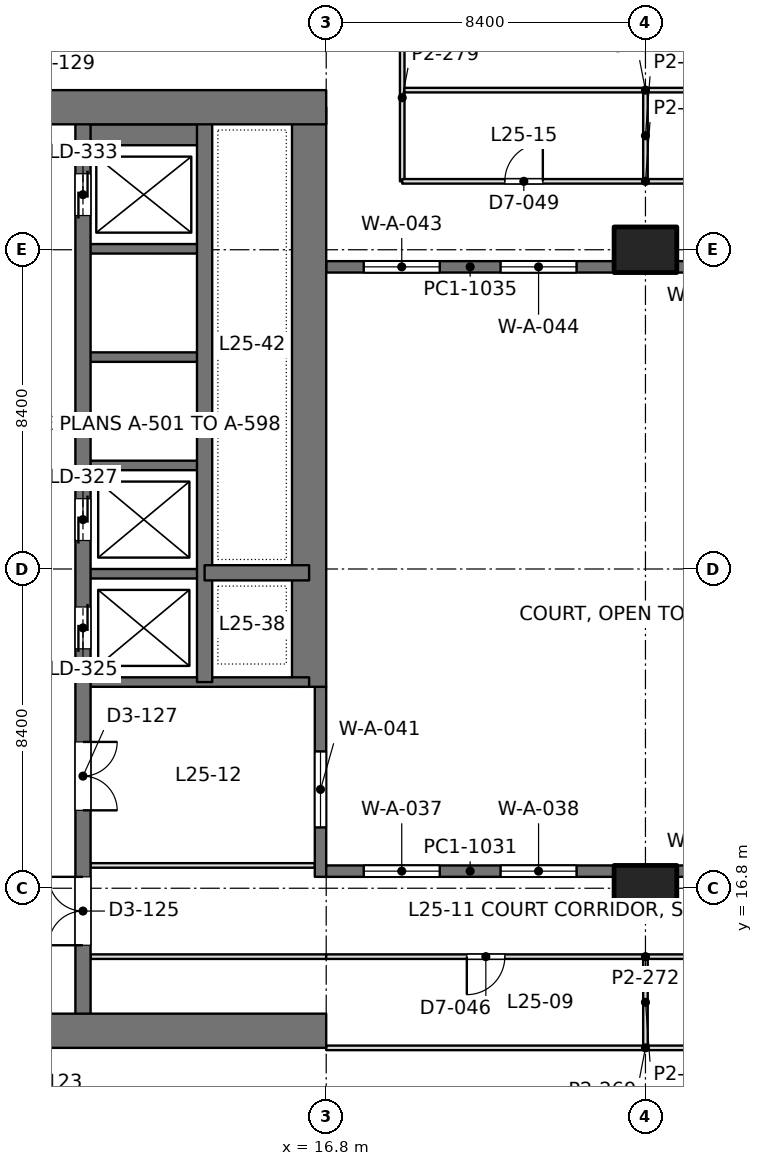
"""IFC4 building model, lengths in metres.
Left out: names, types, materials, properties, quantities, classifications, styles, units other than length and angle.
Written with IfcOpenShell. Run it as: python <this file> out.ifc"""

import sys

from ifc_helpers import new_model, si_unit, direction, frame, frame_2d, origin, origin_2d, place, context, subcontext, project, spatial, rectangle, extrude, element, fill, save


model = new_model("IFC4")
c1 = context("Model", 3, precision=1e-05, world=origin(), true_north=direction((0.0, 1.0)))
c2 = subcontext(c1, "Body", "Model", "MODEL_VIEW")
j1 = project(units=[si_unit("LENGTHUNIT", "METRE"), si_unit("PLANEANGLEUNIT", "RADIAN")], contexts=[c1])
p1 = place(None, origin())
s1 = spatial("IfcSite", under=j1, at=p1, CompositionType="ELEMENT")
p2 = place(p1, origin())
s2 = spatial("IfcBuilding", under=s1, at=p2, CompositionType="ELEMENT")
p3 = place(p2, frame((0.0, 0.0, 113.4)))
s3 = spatial("IfcBuildingStorey", under=s2, at=p3, CompositionType="ELEMENT", Elevation=113.4)
for number, where, z_axis, x_axis in (
    (1, (25.2, 16.8, 0.0), (0.0, 0.0, 1.0), (1.0, 0.0, 0.0)),
    (2, (25.2, 33.6, 0.0), (0.0, 0.0, 1.0), (1.0, 0.0, 0.0)),
):
    element("IfcColumn", number, at=place(p3, frame(where, z_axis=z_axis, x_axis=x_axis)), inside=s3, PredefinedType="COLUMN", context=c2, shape_type="SweptSolid", body=[
        extrude(rectangle(XDim=1.65, YDim=1.2, at=origin_2d()), origin(), (0.0, 0.0, 1.0), 4.2),
    ])
p4 = place(p3, frame((-1.2, 13.05, 0.0), z_axis=(0.0, 0.0, 1.0), x_axis=(1.0, 0.0, 0.0)))
e3 = element("IfcWall", 3, at=p4, inside=s3, PredefinedType="SHEAR", context=c2, shape_type="SweptSolid", body=[
    extrude(rectangle(XDim=18.0, YDim=0.9, at=frame_2d((9.0, 0.0))), origin(), (0.0, 0.0, 1.0), 4.2),
])
p5 = place(p4, frame((8.95, 0.0, 0.0)))
e4 = element("IfcOpeningElement", 4, at=p5, cuts=e3, PredefinedType="OPENING", context=c2, shape_type="SweptSolid", body=[
    extrude(rectangle(XDim=1.8, YDim=2.4, at=frame_2d((0.9, 1.2))), frame((0.0, 0.46, 0.0), z_axis=(0.0, -1.0, 0.0), x_axis=(1.0, 0.0, 0.0)), (0.0, 0.0, 1.0), 0.92),
])
p6 = place(p3, frame((-1.2, 37.35, 0.0), z_axis=(0.0, 0.0, 1.0), x_axis=(1.0, 0.0, 0.0)))
e5 = element("IfcWall", 5, at=p6, inside=s3, PredefinedType="SHEAR", context=c2, shape_type="SweptSolid", body=[
    extrude(rectangle(XDim=18.0, YDim=0.9, at=frame_2d((9.0, 0.0))), origin(), (0.0, 0.0, 1.0), 4.2),
])
p7 = place(p6, frame((8.95, 0.0, 0.0)))
e6 = element("IfcOpeningElement", 6, at=p7, cuts=e5, PredefinedType="OPENING", context=c2, shape_type="SweptSolid", body=[
    extrude(rectangle(XDim=1.8, YDim=2.4, at=frame_2d((0.9, 1.2))), frame((0.0, 0.46, 0.0), z_axis=(0.0, -1.0, 0.0), x_axis=(1.0, 0.0, 0.0)), (0.0, 0.0, 1.0), 0.92),
])
p8 = place(p3, frame((16.35, 22.1, 0.0), z_axis=(0.0, 0.0, 1.0), x_axis=(0.0, 1.0, 0.0)))
e7 = element("IfcWall", 7, at=p8, inside=s3, PredefinedType="SHEAR", context=c2, shape_type="SweptSolid", body=[
    extrude(rectangle(XDim=15.25, YDim=0.9, at=frame_2d((7.625, 0.0))), origin(), (0.0, 0.0, 1.0), 4.2),
])
p9 = place(p3, frame((10.4, 13.05, 0.0), z_axis=(0.0, 0.0, 1.0), x_axis=(0.0, 1.0, 0.0)))
e8 = element("IfcWall", 8, at=p9, inside=s3, PredefinedType="SHEAR", context=c2, shape_type="SweptSolid", body=[
    extrude(rectangle(XDim=24.3, YDim=0.4, at=frame_2d((12.15, 0.0))), origin(), (0.0, 0.0, 1.0), 4.2),
])
p10 = place(p9, frame((10.05, 0.0, 0.0)))
e9 = element("IfcOpeningElement", 9, at=p10, cuts=e8, PredefinedType="OPENING", context=c2, shape_type="SweptSolid", body=[
    extrude(rectangle(XDim=1.1, YDim=2.2, at=frame_2d((0.55, 1.1))), frame((0.0, 0.21, 0.0), z_axis=(0.0, -1.0, 0.0), x_axis=(1.0, 0.0, 0.0)), (0.0, 0.0, 1.0), 0.42),
])
p11 = place(p9, frame((12.9, 0.0, 0.0)))
e10 = element("IfcOpeningElement", 10, at=p11, cuts=e8, PredefinedType="OPENING", context=c2, shape_type="SweptSolid", body=[
    extrude(rectangle(XDim=1.1, YDim=2.2, at=frame_2d((0.55, 1.1))), frame((0.0, 0.21, 0.0), z_axis=(0.0, -1.0, 0.0), x_axis=(1.0, 0.0, 0.0)), (0.0, 0.0, 1.0), 0.42),
])
p12 = place(p9, frame((21.45, 0.0, 0.0)))
e11 = element("IfcOpeningElement", 11, at=p12, cuts=e8, PredefinedType="OPENING", context=c2, shape_type="SweptSolid", body=[
    extrude(rectangle(XDim=1.1, YDim=2.2, at=frame_2d((0.55, 1.1))), frame((0.0, 0.21, 0.0), z_axis=(0.0, -1.0, 0.0), x_axis=(1.0, 0.0, 0.0)), (0.0, 0.0, 1.0), 0.42),
])
p13 = place(p9, frame((2.25, 0.0, 0.0)))
e12 = element("IfcOpeningElement", 12, at=p13, cuts=e8, PredefinedType="OPENING", context=c2, shape_type="SweptSolid", body=[
    extrude(rectangle(XDim=1.8, YDim=2.4, at=frame_2d((0.9, 1.2))), frame((0.0, 0.21, 0.0), z_axis=(0.0, -1.0, 0.0), x_axis=(1.0, 0.0, 0.0)), (0.0, 0.0, 1.0), 0.42),
])
p14 = place(p9, frame((5.8, 0.0, 0.0)))
e13 = element("IfcOpeningElement", 13, at=p14, cuts=e8, PredefinedType="OPENING", context=c2, shape_type="SweptSolid", body=[
    extrude(rectangle(XDim=1.8, YDim=2.4, at=frame_2d((0.9, 1.2))), frame((0.0, 0.21, 0.0), z_axis=(0.0, -1.0, 0.0), x_axis=(1.0, 0.0, 0.0)), (0.0, 0.0, 1.0), 0.42),
])
p15 = place(p3, frame((13.6, 22.225, 0.0), z_axis=(0.0, 0.0, 1.0), x_axis=(0.0, 1.0, 0.0)))
e14 = element("IfcWall", 14, at=p15, inside=s3, PredefinedType="SHEAR", context=c2, shape_type="SweptSolid", body=[
    extrude(rectangle(XDim=15.125, YDim=0.4, at=frame_2d((7.562, 0.0))), origin(), (0.0, 0.0, 1.0), 4.2),
])
p16 = place(p3, frame((13.6, 25.1, 0.0), z_axis=(0.0, 0.0, 1.0), x_axis=(1.0, 0.0, 0.0)))
e15 = element("IfcWall", 15, at=p16, inside=s3, PredefinedType="SHEAR", context=c2, shape_type="SweptSolid", body=[
    extrude(rectangle(XDim=2.75, YDim=0.4, at=frame_2d((1.375, 0.0))), origin(), (0.0, 0.0, 1.0), 4.2),
])
p17 = place(p3, frame((10.4, 22.225, 0.0), z_axis=(0.0, 0.0, 1.0), x_axis=(1.0, 0.0, 0.0)))
e16 = element("IfcWall", 16, at=p17, inside=s3, PredefinedType="SHEAR", context=c2, shape_type="SweptSolid", body=[
    extrude(rectangle(XDim=5.95, YDim=0.25, at=frame_2d((2.975, 0.0))), origin(), (0.0, 0.0, 1.0), 4.2),
])
for number, where, z_axis, x_axis in (
    (17, (10.4, 25.075, 0.0), (0.0, 0.0, 1.0), (1.0, 0.0, 0.0)),
    (18, (10.4, 27.925, 0.0), (0.0, 0.0, 1.0), (1.0, 0.0, 0.0)),
    (19, (10.4, 30.775, 0.0), (0.0, 0.0, 1.0), (1.0, 0.0, 0.0)),
    (20, (10.4, 33.625, 0.0), (0.0, 0.0, 1.0), (1.0, 0.0, 0.0)),
):
    element("IfcWall", number, at=place(p3, frame(where, z_axis=z_axis, x_axis=x_axis)), inside=s3, PredefinedType="SHEAR", context=c2, shape_type="SweptSolid", body=[
        extrude(rectangle(XDim=3.2, YDim=0.25, at=frame_2d((1.6, 0.0))), origin(), (0.0, 0.0, 1.0), 4.2),
    ])
p18 = place(p3, frame((10.4, 36.625, 0.0), z_axis=(0.0, 0.0, 1.0), x_axis=(1.0, 0.0, 0.0)))
e21 = element("IfcWall", 21, at=p18, inside=s3, PredefinedType="SHEAR", context=c2, shape_type="SweptSolid", body=[
    extrude(rectangle(XDim=3.2, YDim=0.55, at=frame_2d((1.6, 0.0))), origin(), (0.0, 0.0, 1.0), 4.2),
])
p19 = place(p3, frame((16.65, 17.1, 0.0), z_axis=(0.0, 0.0, 1.0), x_axis=(0.0, 1.0, 0.0)))
e22 = element("IfcWall", 22, at=p19, inside=s3, PredefinedType="SOLIDWALL", context=c2, shape_type="SweptSolid", body=[
    extrude(rectangle(XDim=5.0, YDim=0.3, at=frame_2d((2.5, 0.0))), origin(), (0.0, 0.0, 1.0), 4.05),
])
p20 = place(p19, frame((1.3, 0.0, 0.1)))
e23 = element("IfcOpeningElement", 23, at=p20, cuts=e22, PredefinedType="OPENING", context=c2, shape_type="SweptSolid", body=[
    extrude(rectangle(XDim=2.0, YDim=3.0, at=frame_2d((1.0, 1.5))), frame((0.0, 0.16, 0.0), z_axis=(0.0, -1.0, 0.0), x_axis=(1.0, 0.0, 0.0)), (0.0, 0.0, 1.0), 0.32),
])
p21 = place(p3, frame((16.8, 17.25, 0.0), z_axis=(0.0, 0.0, 1.0), x_axis=(1.0, 0.0, 0.0)))
e24 = element("IfcWall", 24, at=p21, inside=s3, PredefinedType="SOLIDWALL", context=c2, shape_type="SweptSolid", body=[
    extrude(rectangle(XDim=7.575, YDim=0.3, at=frame_2d((3.788, 0.0))), origin(), (0.0, 0.0, 1.0), 4.05),
])
p22 = place(p21, frame((0.988, 0.0, 0.1)))
e25 = element("IfcOpeningElement", 25, at=p22, cuts=e24, PredefinedType="OPENING", context=c2, shape_type="SweptSolid", body=[
    extrude(rectangle(XDim=2.0, YDim=3.0, at=frame_2d((1.0, 1.5))), frame((0.0, 0.16, 0.0), z_axis=(0.0, -1.0, 0.0), x_axis=(1.0, 0.0, 0.0)), (0.0, 0.0, 1.0), 0.32),
])
p23 = place(p21, frame((4.587, 0.0, 0.1)))
e26 = element("IfcOpeningElement", 26, at=p23, cuts=e24, PredefinedType="OPENING", context=c2, shape_type="SweptSolid", body=[
    extrude(rectangle(XDim=2.0, YDim=3.0, at=frame_2d((1.0, 1.5))), frame((0.0, 0.16, 0.0), z_axis=(0.0, -1.0, 0.0), x_axis=(1.0, 0.0, 0.0)), (0.0, 0.0, 1.0), 0.32),
])
p24 = place(p3, frame((26.025, 17.25, 0.0), z_axis=(0.0, 0.0, 1.0), x_axis=(1.0, 0.0, 0.0)))
e27 = element("IfcWall", 27, at=p24, inside=s3, PredefinedType="SOLIDWALL", context=c2, shape_type="SweptSolid", body=[
    extrude(rectangle(XDim=7.575, YDim=0.3, at=frame_2d((3.788, 0.0))), origin(), (0.0, 0.0, 1.0), 4.05),
])
p25 = place(p24, frame((0.587, 0.0, 0.1)))
e28 = element("IfcOpeningElement", 28, at=p25, cuts=e27, PredefinedType="OPENING", context=c2, shape_type="SweptSolid", body=[
    extrude(rectangle(XDim=2.0, YDim=3.0, at=frame_2d((1.0, 1.5))), frame((0.0, 0.16, 0.0), z_axis=(0.0, -1.0, 0.0), x_axis=(1.0, 0.0, 0.0)), (0.0, 0.0, 1.0), 0.32),
])
p26 = place(p24, frame((4.188, 0.0, 0.1)))
e29 = element("IfcOpeningElement", 29, at=p26, cuts=e27, PredefinedType="OPENING", context=c2, shape_type="SweptSolid", body=[
    extrude(rectangle(XDim=2.0, YDim=3.0, at=frame_2d((1.0, 1.5))), frame((0.0, 0.16, 0.0), z_axis=(0.0, -1.0, 0.0), x_axis=(1.0, 0.0, 0.0)), (0.0, 0.0, 1.0), 0.32),
])
p27 = place(p3, frame((16.8, 33.15, 0.0), z_axis=(0.0, 0.0, 1.0), x_axis=(1.0, 0.0, 0.0)))
e30 = element("IfcWall", 30, at=p27, inside=s3, PredefinedType="SOLIDWALL", context=c2, shape_type="SweptSolid", body=[
    extrude(rectangle(XDim=7.575, YDim=0.3, at=frame_2d((3.788, 0.0))), origin(), (0.0, 0.0, 1.0), 4.05),
])
p28 = place(p27, frame((0.988, 0.0, 0.1)))
e31 = element("IfcOpeningElement", 31, at=p28, cuts=e30, PredefinedType="OPENING", context=c2, shape_type="SweptSolid", body=[
    extrude(rectangle(XDim=2.0, YDim=3.0, at=frame_2d((1.0, 1.5))), frame((0.0, 0.16, 0.0), z_axis=(0.0, -1.0, 0.0), x_axis=(1.0, 0.0, 0.0)), (0.0, 0.0, 1.0), 0.32),
])
p29 = place(p27, frame((4.587, 0.0, 0.1)))
e32 = element("IfcOpeningElement", 32, at=p29, cuts=e30, PredefinedType="OPENING", context=c2, shape_type="SweptSolid", body=[
    extrude(rectangle(XDim=2.0, YDim=3.0, at=frame_2d((1.0, 1.5))), frame((0.0, 0.16, 0.0), z_axis=(0.0, -1.0, 0.0), x_axis=(1.0, 0.0, 0.0)), (0.0, 0.0, 1.0), 0.32),
])
p30 = place(p3, frame((26.025, 33.15, 0.0), z_axis=(0.0, 0.0, 1.0), x_axis=(1.0, 0.0, 0.0)))
e33 = element("IfcWall", 33, at=p30, inside=s3, PredefinedType="SOLIDWALL", context=c2, shape_type="SweptSolid", body=[
    extrude(rectangle(XDim=7.575, YDim=0.3, at=frame_2d((3.788, 0.0))), origin(), (0.0, 0.0, 1.0), 4.05),
])
p31 = place(p30, frame((0.587, 0.0, 0.1)))
e34 = element("IfcOpeningElement", 34, at=p31, cuts=e33, PredefinedType="OPENING", context=c2, shape_type="SweptSolid", body=[
    extrude(rectangle(XDim=2.0, YDim=3.0, at=frame_2d((1.0, 1.5))), frame((0.0, 0.16, 0.0), z_axis=(0.0, -1.0, 0.0), x_axis=(1.0, 0.0, 0.0)), (0.0, 0.0, 1.0), 0.32),
])
p32 = place(p30, frame((4.188, 0.0, 0.1)))
e35 = element("IfcOpeningElement", 35, at=p32, cuts=e33, PredefinedType="OPENING", context=c2, shape_type="SweptSolid", body=[
    extrude(rectangle(XDim=2.0, YDim=3.0, at=frame_2d((1.0, 1.5))), frame((0.0, 0.16, 0.0), z_axis=(0.0, -1.0, 0.0), x_axis=(1.0, 0.0, 0.0)), (0.0, 0.0, 1.0), 0.32),
])
p33 = place(p3, frame((10.598, 17.4, 0.0), z_axis=(0.0, 0.0, 1.0), x_axis=(1.0, 0.0, 0.0)))
e36 = element("IfcWall", 36, at=p33, inside=s3, PredefinedType="PARTITIONING", context=c2, shape_type="SweptSolid", body=[
    extrude(rectangle(XDim=5.904, YDim=0.12, at=frame_2d((2.952, 0.0))), origin(), (0.0, 0.0, 1.0), 3.55),
])
p34 = place(p3, frame((10.598, 15.0, 0.0), z_axis=(0.0, 0.0, 1.0), x_axis=(1.0, 0.0, 0.0)))
e37 = element("IfcWall", 37, at=p34, inside=s3, PredefinedType="PARTITIONING", context=c2, shape_type="SweptSolid", body=[
    extrude(rectangle(XDim=6.204, YDim=0.12, at=frame_2d((3.102, 0.0))), origin(), (0.0, 0.0, 1.0), 3.55),
])
p35 = place(p3, frame((25.2, 12.658, 0.0), z_axis=(0.0, 0.0, 1.0), x_axis=(0.0, 1.0, 0.0)))
e38 = element("IfcWall", 38, at=p35, inside=s3, PredefinedType="PARTITIONING", context=c2, shape_type="SweptSolid", body=[
    extrude(rectangle(XDim=2.284, YDim=0.12, at=frame_2d((1.142, 0.0))), origin(), (0.0, 0.0, 1.0), 3.55),
])
p36 = place(p3, frame((16.798, 15.0, 0.0), z_axis=(0.0, 0.0, 1.0), x_axis=(1.0, 0.0, 0.0)))
e39 = element("IfcWall", 39, at=p36, inside=s3, PredefinedType="PARTITIONING", context=c2, shape_type="SweptSolid", body=[
    extrude(rectangle(XDim=16.804, YDim=0.12, at=frame_2d((8.402, 0.0))), origin(), (0.0, 0.0, 1.0), 3.55),
])
p37 = place(p36, frame((3.702, 0.0, 0.0)))
e40 = element("IfcOpeningElement", 40, at=p37, cuts=e39, PredefinedType="OPENING", context=c2, shape_type="SweptSolid", body=[
    extrude(rectangle(XDim=1.0, YDim=2.4, at=frame_2d((0.5, 1.2))), frame((0.0, 0.07, 0.0), z_axis=(0.0, -1.0, 0.0), x_axis=(1.0, 0.0, 0.0)), (0.0, 0.0, 1.0), 0.14),
])
p38 = place(p36, frame((12.102, 0.0, 0.0)))
e41 = element("IfcOpeningElement", 41, at=p38, cuts=e39, PredefinedType="OPENING", context=c2, shape_type="SweptSolid", body=[
    extrude(rectangle(XDim=1.0, YDim=2.4, at=frame_2d((0.5, 1.2))), frame((0.0, 0.07, 0.0), z_axis=(0.0, -1.0, 0.0), x_axis=(1.0, 0.0, 0.0)), (0.0, 0.0, 1.0), 0.14),
])
p39 = place(p3, frame((16.8, 12.6, 0.0), z_axis=(0.0, 0.0, 1.0), x_axis=(1.0, 0.0, 0.0)))
e42 = element("IfcWall", 42, at=p39, inside=s3, PredefinedType="PARTITIONING", context=c2, shape_type="SweptSolid", body=[
    extrude(rectangle(XDim=16.8, YDim=0.12, at=frame_2d((8.4, 0.0))), origin(), (0.0, 0.0, 1.0), 3.55),
])
p40 = place(p3, frame((18.8, 35.4, 0.0), z_axis=(0.0, 0.0, 1.0), x_axis=(0.0, 1.0, 0.0)))
e43 = element("IfcWall", 43, at=p40, inside=s3, PredefinedType="PARTITIONING", context=c2, shape_type="SweptSolid", body=[
    extrude(rectangle(XDim=4.4, YDim=0.12, at=frame_2d((2.2, 0.0))), origin(), (0.0, 0.0, 1.0), 4.05),
])
p41 = place(p3, frame((25.2, 35.458, 0.0), z_axis=(0.0, 0.0, 1.0), x_axis=(0.0, 1.0, 0.0)))
e44 = element("IfcWall", 44, at=p41, inside=s3, PredefinedType="PARTITIONING", context=c2, shape_type="SweptSolid", body=[
    extrude(rectangle(XDim=2.284, YDim=0.12, at=frame_2d((1.142, 0.0))), origin(), (0.0, 0.0, 1.0), 3.55),
])
p42 = place(p3, frame((18.8, 35.4, 0.0), z_axis=(0.0, 0.0, 1.0), x_axis=(1.0, 0.0, 0.0)))
e45 = element("IfcWall", 45, at=p42, inside=s3, PredefinedType="PARTITIONING", context=c2, shape_type="SweptSolid", body=[
    extrude(rectangle(XDim=12.8, YDim=0.12, at=frame_2d((6.4, 0.0))), origin(), (0.0, 0.0, 1.0), 3.55),
])
p43 = place(p42, frame((2.7, 0.0, 0.0)))
e46 = element("IfcOpeningElement", 46, at=p43, cuts=e45, PredefinedType="OPENING", context=c2, shape_type="SweptSolid", body=[
    extrude(rectangle(XDim=1.0, YDim=2.4, at=frame_2d((0.5, 1.2))), frame((0.0, 0.07, 0.0), z_axis=(0.0, -1.0, 0.0), x_axis=(1.0, 0.0, 0.0)), (0.0, 0.0, 1.0), 0.14),
])
p44 = place(p42, frame((9.1, 0.0, 0.0)))
e47 = element("IfcOpeningElement", 47, at=p44, cuts=e45, PredefinedType="OPENING", context=c2, shape_type="SweptSolid", body=[
    extrude(rectangle(XDim=1.0, YDim=2.4, at=frame_2d((0.5, 1.2))), frame((0.0, 0.07, 0.0), z_axis=(0.0, -1.0, 0.0), x_axis=(1.0, 0.0, 0.0)), (0.0, 0.0, 1.0), 0.14),
])
p45 = place(p3, frame((18.858, 37.8, 0.0), z_axis=(0.0, 0.0, 1.0), x_axis=(1.0, 0.0, 0.0)))
e48 = element("IfcWall", 48, at=p45, inside=s3, PredefinedType="PARTITIONING", context=c2, shape_type="SweptSolid", body=[
    extrude(rectangle(XDim=12.684, YDim=0.12, at=frame_2d((6.342, 0.0))), origin(), (0.0, 0.0, 1.0), 3.55),
])
p46 = place(p20, origin())
e49 = element("IfcWindow", 49, at=p46, inside=s3, PartitioningType="SINGLE_PANEL", PredefinedType="WINDOW", context=c2, shape_type="SweptSolid", body=[
    extrude(rectangle(XDim=2.0, YDim=3.0, at=frame_2d((1.0, 1.5))), frame((0.0, 0.03, 0.0), z_axis=(0.0, -1.0, 0.0), x_axis=(1.0, 0.0, 0.0)), (0.0, 0.0, 1.0), 0.06),
])
fill(e23, e49)
p47 = place(p22, origin())
e50 = element("IfcWindow", 50, at=p47, inside=s3, PartitioningType="SINGLE_PANEL", PredefinedType="WINDOW", context=c2, shape_type="SweptSolid", body=[
    extrude(rectangle(XDim=2.0, YDim=3.0, at=frame_2d((1.0, 1.5))), frame((0.0, 0.03, 0.0), z_axis=(0.0, -1.0, 0.0), x_axis=(1.0, 0.0, 0.0)), (0.0, 0.0, 1.0), 0.06),
])
fill(e25, e50)
p48 = place(p23, origin())
e51 = element("IfcWindow", 51, at=p48, inside=s3, PartitioningType="SINGLE_PANEL", PredefinedType="WINDOW", context=c2, shape_type="SweptSolid", body=[
    extrude(rectangle(XDim=2.0, YDim=3.0, at=frame_2d((1.0, 1.5))), frame((0.0, 0.03, 0.0), z_axis=(0.0, -1.0, 0.0), x_axis=(1.0, 0.0, 0.0)), (0.0, 0.0, 1.0), 0.06),
])
fill(e26, e51)
p49 = place(p28, origin())
e52 = element("IfcWindow", 52, at=p49, inside=s3, PartitioningType="SINGLE_PANEL", PredefinedType="WINDOW", context=c2, shape_type="SweptSolid", body=[
    extrude(rectangle(XDim=2.0, YDim=3.0, at=frame_2d((1.0, 1.5))), frame((0.0, 0.03, 0.0), z_axis=(0.0, -1.0, 0.0), x_axis=(1.0, 0.0, 0.0)), (0.0, 0.0, 1.0), 0.06),
])
fill(e31, e52)
p50 = place(p29, origin())
e53 = element("IfcWindow", 53, at=p50, inside=s3, PartitioningType="SINGLE_PANEL", PredefinedType="WINDOW", context=c2, shape_type="SweptSolid", body=[
    extrude(rectangle(XDim=2.0, YDim=3.0, at=frame_2d((1.0, 1.5))), frame((0.0, 0.03, 0.0), z_axis=(0.0, -1.0, 0.0), x_axis=(1.0, 0.0, 0.0)), (0.0, 0.0, 1.0), 0.06),
])
fill(e32, e53)
p51 = place(p10, origin())
e54 = element("IfcDoor", 54, at=p51, inside=s3, OperationType="DOUBLE_DOOR_SLIDING", PredefinedType="DOOR", context=c2, shape_type="SweptSolid", body=[
    extrude(rectangle(XDim=1.1, YDim=2.2, at=frame_2d((0.55, 1.1))), frame((0.0, 0.025, 0.0), z_axis=(0.0, -1.0, 0.0), x_axis=(1.0, 0.0, 0.0)), (0.0, 0.0, 1.0), 0.05),
])
fill(e9, e54)
p52 = place(p11, origin())
e55 = element("IfcDoor", 55, at=p52, inside=s3, OperationType="DOUBLE_DOOR_SLIDING", PredefinedType="DOOR", context=c2, shape_type="SweptSolid", body=[
    extrude(rectangle(XDim=1.1, YDim=2.2, at=frame_2d((0.55, 1.1))), frame((0.0, 0.025, 0.0), z_axis=(0.0, -1.0, 0.0), x_axis=(1.0, 0.0, 0.0)), (0.0, 0.0, 1.0), 0.05),
])
fill(e10, e55)
p53 = place(p12, origin())
e56 = element("IfcDoor", 56, at=p53, inside=s3, OperationType="DOUBLE_DOOR_SLIDING", PredefinedType="DOOR", context=c2, shape_type="SweptSolid", body=[
    extrude(rectangle(XDim=1.1, YDim=2.2, at=frame_2d((0.55, 1.1))), frame((0.0, 0.025, 0.0), z_axis=(0.0, -1.0, 0.0), x_axis=(1.0, 0.0, 0.0)), (0.0, 0.0, 1.0), 0.05),
])
fill(e11, e56)
p54 = place(p13, origin())
e57 = element("IfcDoor", 57, at=p54, inside=s3, OperationType="DOUBLE_DOOR_SINGLE_SWING", PredefinedType="DOOR", context=c2, shape_type="SweptSolid", body=[
    extrude(rectangle(XDim=1.8, YDim=2.4, at=frame_2d((0.9, 1.2))), frame((0.0, 0.025, 0.0), z_axis=(0.0, -1.0, 0.0), x_axis=(1.0, 0.0, 0.0)), (0.0, 0.0, 1.0), 0.05),
])
fill(e12, e57)
p55 = place(p14, frame((1.8, 0.0, 0.0), z_axis=(0.0, 0.0, 1.0), x_axis=(-1.0, 0.0, 0.0)))
e58 = element("IfcDoor", 58, at=p55, inside=s3, OperationType="DOUBLE_DOOR_SINGLE_SWING", PredefinedType="DOOR", context=c2, shape_type="SweptSolid", body=[
    extrude(rectangle(XDim=1.8, YDim=2.4, at=frame_2d((0.9, 1.2))), frame((0.0, 0.025, 0.0), z_axis=(0.0, -1.0, 0.0), x_axis=(1.0, 0.0, 0.0)), (0.0, 0.0, 1.0), 0.05),
])
fill(e13, e58)
p56 = place(p37, frame((1.0, 0.0, 0.0), z_axis=(0.0, 0.0, 1.0), x_axis=(-1.0, 0.0, 0.0)))
e59 = element("IfcDoor", 59, at=p56, inside=s3, OperationType="SINGLE_SWING_RIGHT", PredefinedType="DOOR", context=c2, shape_type="SweptSolid", body=[
    extrude(rectangle(XDim=1.0, YDim=2.4, at=frame_2d((0.5, 1.2))), frame((0.0, 0.025, 0.0), z_axis=(0.0, -1.0, 0.0), x_axis=(1.0, 0.0, 0.0)), (0.0, 0.0, 1.0), 0.05),
])
fill(e40, e59)
p57 = place(p43, origin())
e60 = element("IfcDoor", 60, at=p57, inside=s3, OperationType="SINGLE_SWING_RIGHT", PredefinedType="DOOR", context=c2, shape_type="SweptSolid", body=[
    extrude(rectangle(XDim=1.0, YDim=2.4, at=frame_2d((0.5, 1.2))), frame((0.0, 0.025, 0.0), z_axis=(0.0, -1.0, 0.0), x_axis=(1.0, 0.0, 0.0)), (0.0, 0.0, 1.0), 0.05),
])
fill(e46, e60)
save(model, sys.argv[1])
